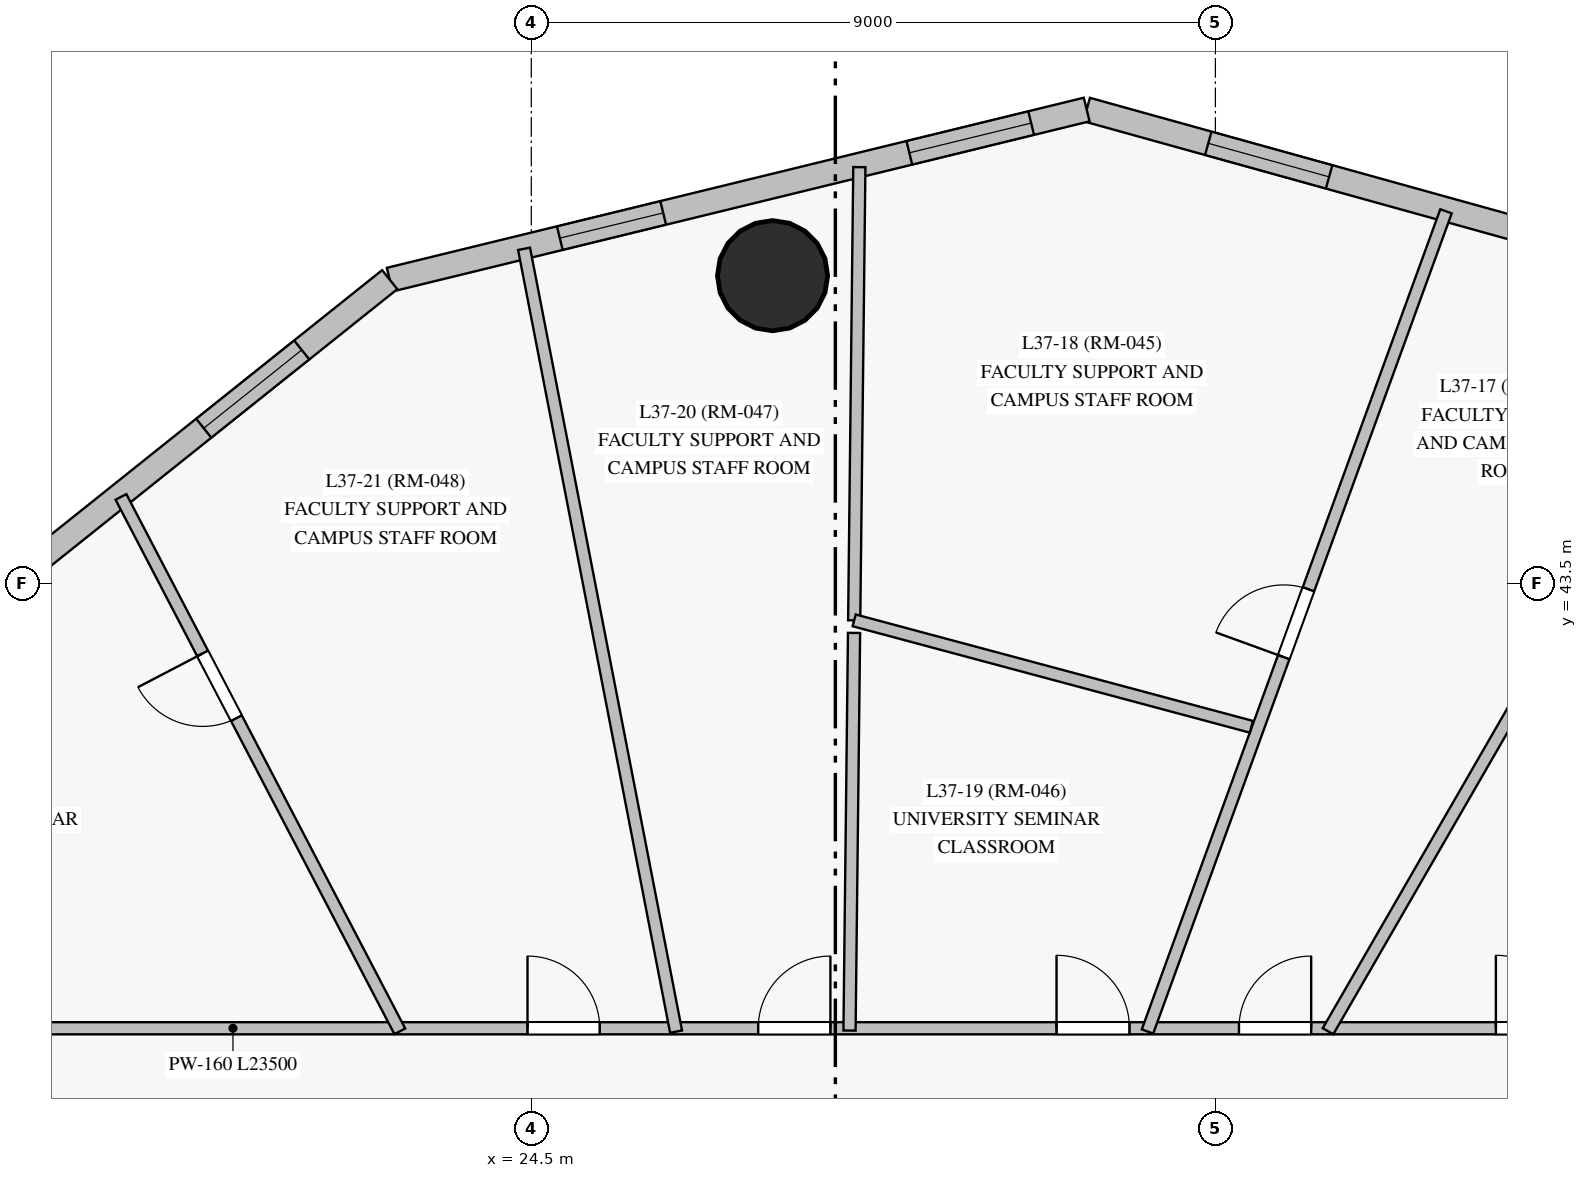
"""IFC4 building model, lengths in metres.
Left out: names, types, materials, properties, quantities, classifications, styles, units other than length and angle.
Written with IfcOpenShell. Run it as: python <this file> out.ifc"""

import sys

from ifc_helpers import new_model, si_unit, direction, frame, frame_2d, origin, origin_with_axes, origin_2d, place, context, subcontext, project, spatial, rectangle, circle, extrude, source, transform, mapped, element, fill, save


model = new_model("IFC4")
c1 = context("Model", 3, precision=1e-05, world=origin(), true_north=direction((0.0, 1.0)))
c2 = subcontext(c1, "Body", "Model", "MODEL_VIEW")
j1 = project(units=[si_unit("LENGTHUNIT", "METRE"), si_unit("PLANEANGLEUNIT", "RADIAN")], contexts=[c1])
p1 = place(None, origin())
s1 = spatial("IfcSite", under=j1, at=p1, CompositionType="ELEMENT")
p2 = place(p1, origin())
s2 = spatial("IfcBuilding", under=s1, at=p2, CompositionType="ELEMENT")
p3 = place(p2, frame((0.0, 0.0, 132.8)))
s3 = spatial("IfcBuildingStorey", under=s2, at=p3, CompositionType="ELEMENT", Elevation=132.8)
m1 = source(origin_with_axes(), c2, "Body", "SweptSolid", [
    extrude(circle(Radius=0.725, at=origin_2d()), origin(), (0.0, 0.0, 1.0), 3.05),
])
p4 = place(p3, frame((27.674, 47.551, 0.0), z_axis=(0.0, 0.0, 1.0), x_axis=(1.0, 0.0, 0.0)))
e1 = element("IfcColumn", 1, at=p4, inside=s3, PredefinedType="COLUMN", context=c2, shape_type="MappedRepresentation", body=[
    mapped(m1, transform((0.0, 0.0, 0.0), scale=1.0)),
])
p5 = place(p3, frame((38.321, 47.927, 0.0), z_axis=(0.0, 0.0, 1.0), x_axis=(-0.963524117633, 0.267621513971, 0.0)))
e2 = element("IfcWall", 2, at=p5, inside=s3, PredefinedType="SOLIDWALL", context=c2, shape_type="SweptSolid", body=[
    extrude(rectangle(XDim=6.761, YDim=0.32, at=frame_2d((3.38, 0.0))), origin(), (0.0, 0.0, 1.0), 2.825),
])
p6 = place(p5, frame((3.451, 0.0, 0.85)))
e3 = element("IfcOpeningElement", 3, at=p6, cuts=e2, PredefinedType="OPENING", context=c2, shape_type="SweptSolid", body=[
    extrude(rectangle(XDim=1.65, YDim=1.65, at=frame_2d((0.825, 0.825))), frame((0.0, 0.17, 0.0), z_axis=(0.0, -1.0, 0.0), x_axis=(1.0, 0.0, 0.0)), (0.0, 0.0, 1.0), 0.34),
])
p7 = place(p3, frame((31.807, 49.737, 0.0), z_axis=(0.0, 0.0, 1.0), x_axis=(-0.971481548307, -0.237115164634, 0.0)))
e4 = element("IfcWall", 4, at=p7, inside=s3, PredefinedType="SOLIDWALL", context=c2, shape_type="SweptSolid", body=[
    extrude(rectangle(XDim=9.439, YDim=0.32, at=frame_2d((4.719, 0.0))), origin(), (0.0, 0.0, 1.0), 2.825),
])
p8 = place(p7, frame((0.752, 0.0, 0.85)))
e5 = element("IfcOpeningElement", 5, at=p8, cuts=e4, PredefinedType="OPENING", context=c2, shape_type="SweptSolid", body=[
    extrude(rectangle(XDim=1.65, YDim=1.65, at=frame_2d((0.825, 0.825))), frame((0.0, 0.17, 0.0), z_axis=(0.0, -1.0, 0.0), x_axis=(1.0, 0.0, 0.0)), (0.0, 0.0, 1.0), 0.34),
])
p9 = place(p7, frame((5.735, 0.0, 0.85)))
e6 = element("IfcOpeningElement", 6, at=p9, cuts=e4, PredefinedType="OPENING", context=c2, shape_type="SweptSolid", body=[
    extrude(rectangle(XDim=1.4, YDim=1.65, at=frame_2d((0.7, 0.825))), frame((0.0, 0.17, 0.0), z_axis=(0.0, -1.0, 0.0), x_axis=(1.0, 0.0, 0.0)), (0.0, 0.0, 1.0), 0.34),
])
p10 = place(p3, frame((22.637, 47.499, 0.0), z_axis=(0.0, 0.0, 1.0), x_axis=(-0.781301477926, -0.624153827667, 0.0)))
e7 = element("IfcWall", 7, at=p10, inside=s3, PredefinedType="SOLIDWALL", context=c2, shape_type="SweptSolid", body=[
    extrude(rectangle(XDim=13.646, YDim=0.32, at=frame_2d((6.823, 0.0))), origin(), (0.0, 0.0, 1.0), 2.825),
])
p11 = place(p10, frame((1.482, 0.0, 0.85)))
e8 = element("IfcOpeningElement", 8, at=p11, cuts=e7, PredefinedType="OPENING", context=c2, shape_type="SweptSolid", body=[
    extrude(rectangle(XDim=1.65, YDim=1.65, at=frame_2d((0.825, 0.825))), frame((0.0, 0.17, 0.0), z_axis=(0.0, -1.0, 0.0), x_axis=(1.0, 0.0, 0.0)), (0.0, 0.0, 1.0), 0.34),
])
p12 = place(p10, frame((6.147, 0.0, 0.85)))
e9 = element("IfcOpeningElement", 9, at=p12, cuts=e7, PredefinedType="OPENING", context=c2, shape_type="SweptSolid", body=[
    extrude(rectangle(XDim=1.65, YDim=1.65, at=frame_2d((0.825, 0.825))), frame((0.0, 0.17, 0.0), z_axis=(0.0, -1.0, 0.0), x_axis=(1.0, 0.0, 0.0)), (0.0, 0.0, 1.0), 0.34),
])
p13 = place(p10, frame((10.343, 0.0, 0.85)))
e10 = element("IfcOpeningElement", 10, at=p13, cuts=e7, PredefinedType="OPENING", context=c2, shape_type="SweptSolid", body=[
    extrude(rectangle(XDim=1.65, YDim=1.65, at=frame_2d((0.825, 0.825))), frame((0.0, 0.17, 0.0), z_axis=(0.0, -1.0, 0.0), x_axis=(1.0, 0.0, 0.0)), (0.0, 0.0, 1.0), 0.34),
])
p14 = place(p3, frame((16.7, 37.65, 0.0), z_axis=(0.0, 0.0, 1.0), x_axis=(1.0, 0.0, 0.0)))
e11 = element("IfcWall", 11, at=p14, inside=s3, PredefinedType="PARTITIONING", context=c2, shape_type="SweptSolid", body=[
    extrude(rectangle(XDim=23.5, YDim=0.16, at=frame_2d((11.75, 0.0))), origin(), (0.0, 0.0, 1.0), 2.325),
])
p15 = place(p14, frame((20.49, 0.0, 0.0)))
e12 = element("IfcOpeningElement", 12, at=p15, cuts=e11, PredefinedType="OPENING", context=c2, shape_type="SweptSolid", body=[
    extrude(rectangle(XDim=0.96, YDim=2.15, at=frame_2d((0.48, 1.075))), frame((0.0, 0.09, 0.0), z_axis=(0.0, -1.0, 0.0), x_axis=(1.0, 0.0, 0.0)), (0.0, 0.0, 1.0), 0.18),
])
p16 = place(p14, frame((17.11, 0.0, 0.0)))
e13 = element("IfcOpeningElement", 13, at=p16, cuts=e11, PredefinedType="OPENING", context=c2, shape_type="SweptSolid", body=[
    extrude(rectangle(XDim=0.95, YDim=2.15, at=frame_2d((0.475, 1.075))), frame((0.0, 0.09, 0.0), z_axis=(0.0, -1.0, 0.0), x_axis=(1.0, 0.0, 0.0)), (0.0, 0.0, 1.0), 0.18),
])
p17 = place(p14, frame((14.71, 0.0, 0.0)))
e14 = element("IfcOpeningElement", 14, at=p17, cuts=e11, PredefinedType="OPENING", context=c2, shape_type="SweptSolid", body=[
    extrude(rectangle(XDim=0.96, YDim=2.15, at=frame_2d((0.48, 1.075))), frame((0.0, 0.09, 0.0), z_axis=(0.0, -1.0, 0.0), x_axis=(1.0, 0.0, 0.0)), (0.0, 0.0, 1.0), 0.18),
])
p18 = place(p14, frame((10.785, 0.0, 0.0)))
e15 = element("IfcOpeningElement", 15, at=p18, cuts=e11, PredefinedType="OPENING", context=c2, shape_type="SweptSolid", body=[
    extrude(rectangle(XDim=0.95, YDim=2.15, at=frame_2d((0.475, 1.075))), frame((0.0, 0.09, 0.0), z_axis=(0.0, -1.0, 0.0), x_axis=(1.0, 0.0, 0.0)), (0.0, 0.0, 1.0), 0.18),
])
p19 = place(p14, frame((7.75, 0.0, 0.0)))
e16 = element("IfcOpeningElement", 16, at=p19, cuts=e11, PredefinedType="OPENING", context=c2, shape_type="SweptSolid", body=[
    extrude(rectangle(XDim=0.95, YDim=2.15, at=frame_2d((0.475, 1.075))), frame((0.0, 0.09, 0.0), z_axis=(0.0, -1.0, 0.0), x_axis=(1.0, 0.0, 0.0)), (0.0, 0.0, 1.0), 0.18),
])
p20 = place(p3, frame((32.607, 37.608, 0.0), z_axis=(0.0, 0.0, 1.0), x_axis=(0.34201277542, 0.939695302452, 0.0)))
e17 = element("IfcWall", 17, at=p20, inside=s3, PredefinedType="PARTITIONING", context=c2, shape_type="SweptSolid", body=[
    extrude(rectangle(XDim=11.483, YDim=0.16, at=frame_2d((5.741, 0.0))), origin(), (0.0, 0.0, 1.0), 2.825),
])
p21 = place(p20, frame((5.241, 0.0, 0.0)))
e18 = element("IfcOpeningElement", 18, at=p21, cuts=e17, PredefinedType="OPENING", context=c2, shape_type="SweptSolid", body=[
    extrude(rectangle(XDim=0.95, YDim=2.15, at=frame_2d((0.475, 1.075))), frame((0.0, 0.09, 0.0), z_axis=(0.0, -1.0, 0.0), x_axis=(1.0, 0.0, 0.0)), (0.0, 0.0, 1.0), 0.18),
])
p22 = place(p3, frame((26.405, 37.606, 0.0), z_axis=(0.0, 0.0, 1.0), x_axis=(-0.190621740305, 0.981663563612, 0.0)))
e19 = element("IfcWall", 19, at=p22, inside=s3, PredefinedType="PARTITIONING", context=c2, shape_type="SweptSolid", body=[
    extrude(rectangle(XDim=10.491, YDim=0.16, at=frame_2d((5.245, 0.0))), origin(), (0.0, 0.0, 1.0), 2.225),
])
p23 = place(p3, frame((34.982, 37.611, 0.0), z_axis=(0.0, 0.0, 1.0), x_axis=(0.499853576741, 0.86610992479, 0.0)))
e20 = element("IfcWall", 20, at=p23, inside=s3, PredefinedType="PARTITIONING", context=c2, shape_type="SweptSolid", body=[
    extrude(rectangle(XDim=9.402, YDim=0.16, at=frame_2d((4.701, 0.0))), origin(), (0.0, 0.0, 1.0), 2.825),
])
p24 = place(p3, frame((22.77, 37.61, 0.0), z_axis=(0.0, 0.0, 1.0), x_axis=(-0.462638604279, 0.886546965384, 0.0)))
e21 = element("IfcWall", 21, at=p24, inside=s3, PredefinedType="PARTITIONING", context=c2, shape_type="SweptSolid", body=[
    extrude(rectangle(XDim=7.93, YDim=0.16, at=frame_2d((3.965, 0.0))), origin(), (0.0, 0.0, 1.0), 2.825),
])
p25 = place(p24, frame((4.647, 0.0, 0.0)))
e22 = element("IfcOpeningElement", 22, at=p25, cuts=e21, PredefinedType="OPENING", context=c2, shape_type="SweptSolid", body=[
    extrude(rectangle(XDim=0.96, YDim=2.15, at=frame_2d((0.48, 1.075))), frame((0.0, 0.09, 0.0), z_axis=(0.0, -1.0, 0.0), x_axis=(1.0, 0.0, 0.0)), (0.0, 0.0, 1.0), 0.18),
])
p26 = place(p3, frame((28.748, 43.016, 0.0), z_axis=(0.0, 0.0, 1.0), x_axis=(0.011381975681, 0.999935223217, 0.0)))
e23 = element("IfcWall", 23, at=p26, inside=s3, PredefinedType="PARTITIONING", context=c2, shape_type="SweptSolid", body=[
    extrude(rectangle(XDim=5.963, YDim=0.16, at=frame_2d((2.981, 0.0))), origin(), (0.0, 0.0, 1.0), 2.825),
])
p27 = place(p3, frame((33.973, 41.616, 0.0), z_axis=(0.0, 0.0, 1.0), x_axis=(-0.965924884927, 0.258822558289, 0.0)))
e24 = element("IfcWall", 24, at=p27, inside=s3, PredefinedType="PARTITIONING", context=c2, shape_type="SweptSolid", body=[
    extrude(rectangle(XDim=5.41, YDim=0.16, at=frame_2d((2.705, 0.0))), origin(), (0.0, 0.0, 1.0), 2.325),
])
p28 = place(p3, frame((28.687, 37.62, 0.0), z_axis=(0.0, 0.0, 1.0), x_axis=(0.011386763484, 0.999935168707, 0.0)))
e25 = element("IfcWall", 25, at=p28, inside=s3, PredefinedType="PARTITIONING", context=c2, shape_type="SweptSolid", body=[
    extrude(rectangle(XDim=5.231, YDim=0.16, at=frame_2d((2.616, 0.0))), origin(), (0.0, 0.0, 1.0), 2.825),
])
m2 = source(origin_with_axes(), c2, "Body", "SweptSolid", [
    extrude(rectangle(XDim=1.65, YDim=1.65, at=frame_2d((0.825, 0.825))), frame((0.0, 0.03, 0.0), z_axis=(0.0, -1.0, 0.0), x_axis=(1.0, 0.0, 0.0)), (0.0, 0.0, 1.0), 0.06),
])
p29 = place(p6, origin())
e26 = element("IfcWindow", 26, at=p29, inside=s3, PartitioningType="SINGLE_PANEL", PredefinedType="WINDOW", context=c2, shape_type="MappedRepresentation", body=[
    mapped(m2, transform((0.0, 0.0, 0.0), scale=1.0)),
])
fill(e3, e26)
p30 = place(p8, origin())
e27 = element("IfcWindow", 27, at=p30, inside=s3, PartitioningType="SINGLE_PANEL", PredefinedType="WINDOW", context=c2, shape_type="MappedRepresentation", body=[
    mapped(m2, transform((0.0, 0.0, 0.0), scale=1.0)),
])
fill(e5, e27)
m3 = source(origin_with_axes(), c2, "Body", "SweptSolid", [
    extrude(rectangle(XDim=1.4, YDim=1.65, at=frame_2d((0.7, 0.825))), frame((0.0, 0.03, 0.0), z_axis=(0.0, -1.0, 0.0), x_axis=(1.0, 0.0, 0.0)), (0.0, 0.0, 1.0), 0.06),
])
p31 = place(p9, origin())
e28 = element("IfcWindow", 28, at=p31, inside=s3, PartitioningType="SINGLE_PANEL", PredefinedType="WINDOW", context=c2, shape_type="MappedRepresentation", body=[
    mapped(m3, transform((0.0, 0.0, 0.0), scale=1.0)),
])
fill(e6, e28)
p32 = place(p11, origin())
e29 = element("IfcWindow", 29, at=p32, inside=s3, PartitioningType="SINGLE_PANEL", PredefinedType="WINDOW", context=c2, shape_type="MappedRepresentation", body=[
    mapped(m2, transform((0.0, 0.0, 0.0), scale=1.0)),
])
fill(e8, e29)
m4 = source(origin_with_axes(), c2, "Body", "SweptSolid", [
    extrude(rectangle(XDim=0.96, YDim=2.15, at=frame_2d((0.48, 1.075))), frame((0.0, 0.025, 0.0), z_axis=(0.0, -1.0, 0.0), x_axis=(1.0, 0.0, 0.0)), (0.0, 0.0, 1.0), 0.05),
])
p33 = place(p15, origin())
e30 = element("IfcDoor", 30, at=p33, inside=s3, OperationType="SINGLE_SWING_LEFT", PredefinedType="DOOR", context=c2, shape_type="MappedRepresentation", body=[
    mapped(m4, transform((0.0, 0.0, 0.0), scale=1.0)),
])
fill(e12, e30)
m5 = source(origin_with_axes(), c2, "Body", "SweptSolid", [
    extrude(rectangle(XDim=0.95, YDim=2.15, at=frame_2d((0.475, 1.075))), frame((0.0, 0.025, 0.0), z_axis=(0.0, -1.0, 0.0), x_axis=(1.0, 0.0, 0.0)), (0.0, 0.0, 1.0), 0.05),
])
p34 = place(p16, origin())
e31 = element("IfcDoor", 31, at=p34, inside=s3, OperationType="SINGLE_SWING_RIGHT", PredefinedType="DOOR", context=c2, shape_type="MappedRepresentation", body=[
    mapped(m5, transform((0.0, 0.0, 0.0), scale=1.0)),
])
fill(e13, e31)
p35 = place(p17, origin())
e32 = element("IfcDoor", 32, at=p35, inside=s3, OperationType="SINGLE_SWING_LEFT", PredefinedType="DOOR", context=c2, shape_type="MappedRepresentation", body=[
    mapped(m4, transform((0.0, 0.0, 0.0), scale=1.0)),
])
fill(e14, e32)
p36 = place(p18, origin())
e33 = element("IfcDoor", 33, at=p36, inside=s3, OperationType="SINGLE_SWING_RIGHT", PredefinedType="DOOR", context=c2, shape_type="MappedRepresentation", body=[
    mapped(m5, transform((0.0, 0.0, 0.0), scale=1.0)),
])
fill(e15, e33)
p37 = place(p19, origin())
e34 = element("IfcDoor", 34, at=p37, inside=s3, OperationType="SINGLE_SWING_LEFT", PredefinedType="DOOR", context=c2, shape_type="MappedRepresentation", body=[
    mapped(m5, transform((0.0, 0.0, 0.0), scale=1.0)),
])
fill(e16, e34)
p38 = place(p21, origin())
e35 = element("IfcDoor", 35, at=p38, inside=s3, OperationType="SINGLE_SWING_LEFT", PredefinedType="DOOR", context=c2, shape_type="MappedRepresentation", body=[
    mapped(m5, transform((0.0, 0.0, 0.0), scale=1.0)),
])
fill(e18, e35)
p39 = place(p25, origin())
e36 = element("IfcDoor", 36, at=p39, inside=s3, OperationType="SINGLE_SWING_RIGHT", PredefinedType="DOOR", context=c2, shape_type="MappedRepresentation", body=[
    mapped(m4, transform((0.0, 0.0, 0.0), scale=1.0)),
])
fill(e22, e36)
save(model, sys.argv[1])
